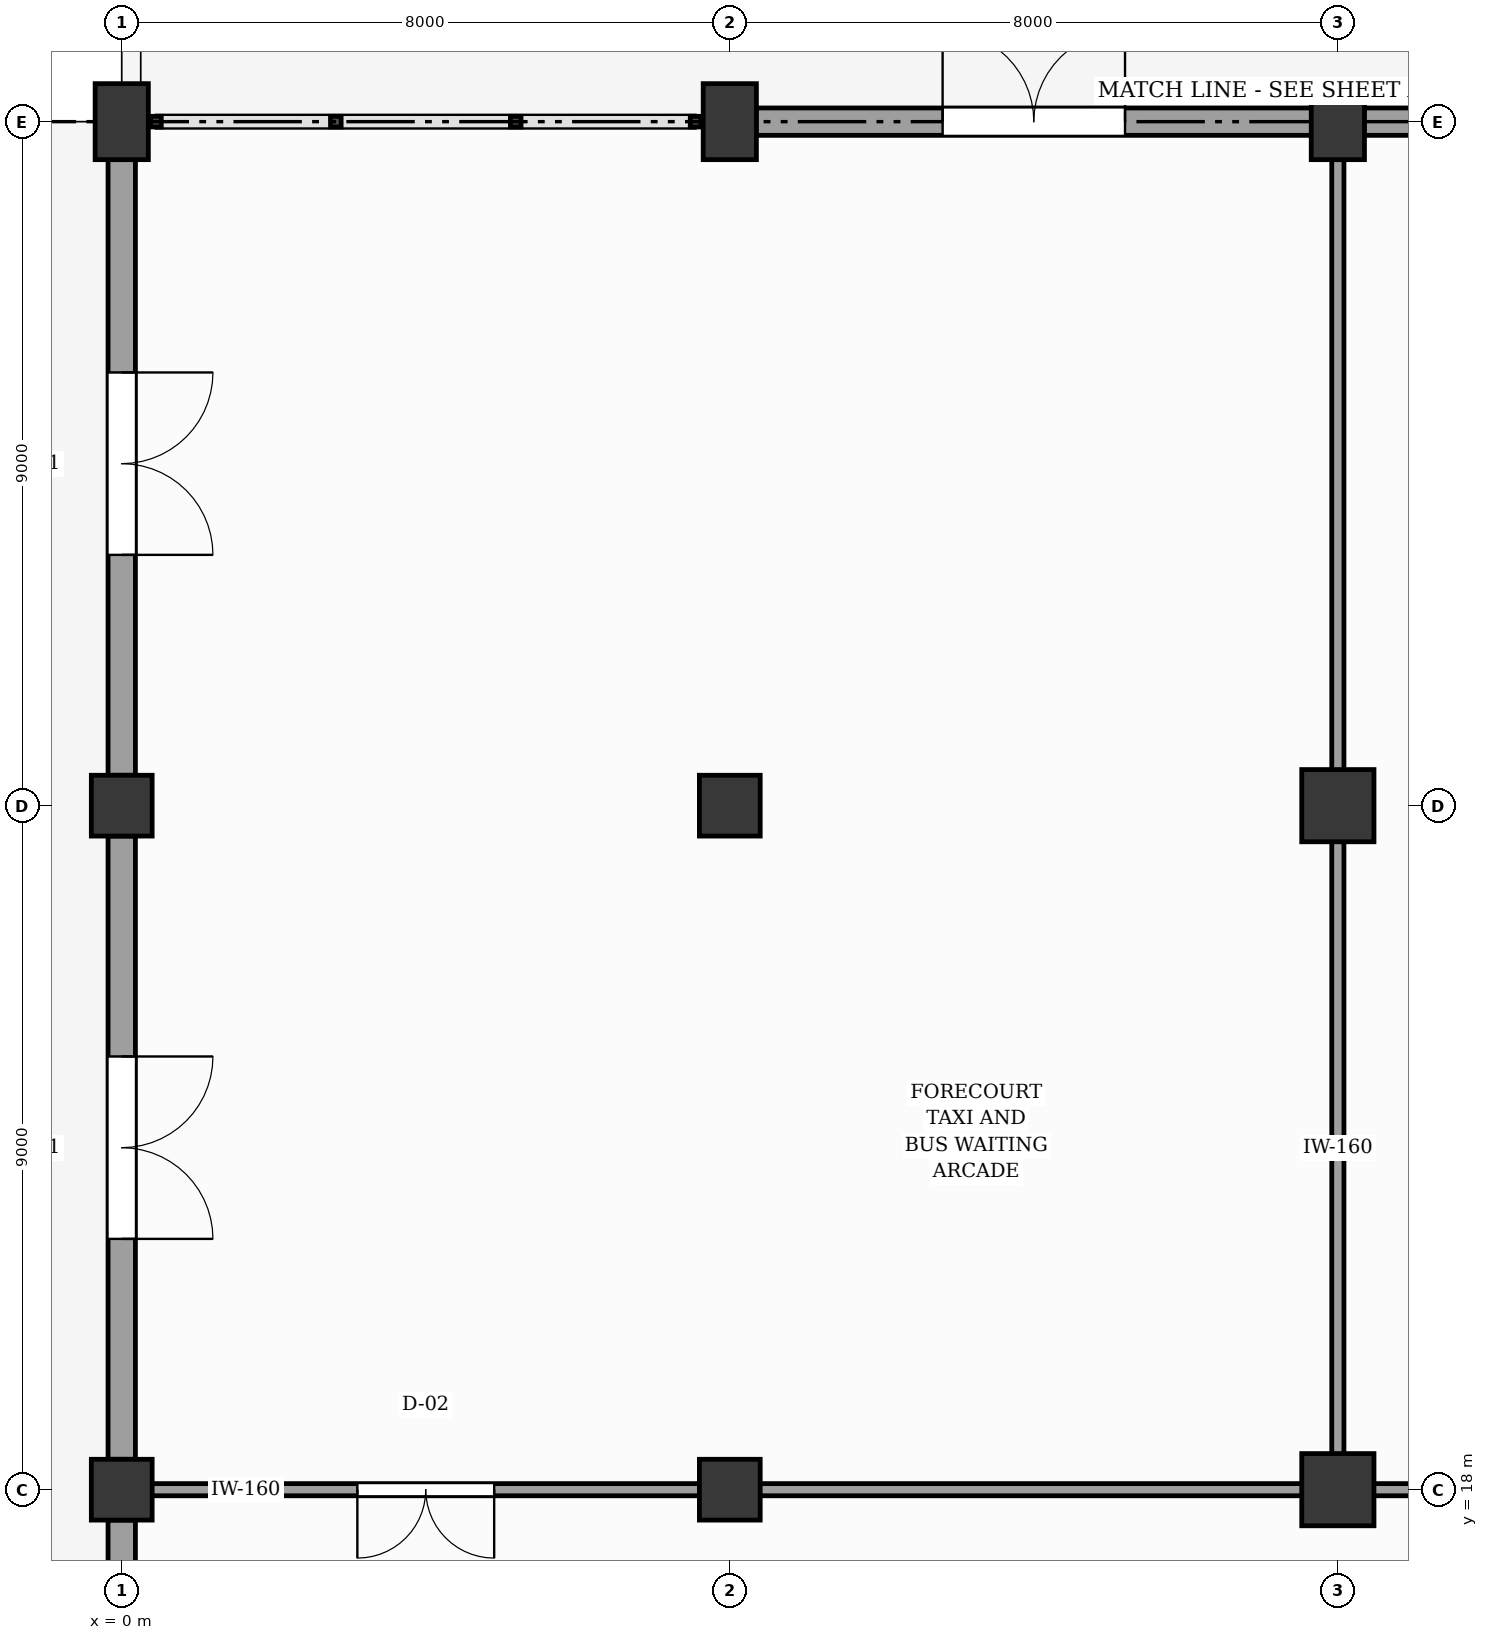
"""IFC4 building model, lengths in metres.
Left out: names, types, materials, properties, quantities, classifications, styles, units other than length and angle.
Written with IfcOpenShell. Run it as: python <this file> out.ifc"""

import sys

from ifc_helpers import new_model, si_unit, direction, frame, frame_2d, origin, origin_2d, place, context, subcontext, project, spatial, rectangle, extrude, element, fill, save


model = new_model("IFC4")
c1 = context("Model", 3, precision=1e-05, world=origin(), true_north=direction((0.0, 1.0)))
c2 = subcontext(c1, "Body", "Model", "MODEL_VIEW")
j1 = project(units=[si_unit("LENGTHUNIT", "METRE"), si_unit("PLANEANGLEUNIT", "RADIAN")], contexts=[c1])
p1 = place(None, origin())
s1 = spatial("IfcSite", under=j1, at=p1, CompositionType="ELEMENT")
p2 = place(p1, origin())
s2 = spatial("IfcBuilding", under=s1, at=p2, CompositionType="ELEMENT")
p3 = place(p2, origin())
s3 = spatial("IfcBuildingStorey", under=s2, at=p3, CompositionType="ELEMENT", Elevation=0.0)
for number, where, z_axis, x_axis in (
    (1, (0.0, 18.0, -0.3), (0.0, 0.0, 1.0), (1.0, 0.0, 0.0)),
    (2, (0.0, 27.0, -0.3), (0.0, 0.0, 1.0), (1.0, 0.0, 0.0)),
):
    element("IfcColumn", number, at=place(p3, frame(where, z_axis=z_axis, x_axis=x_axis)), inside=s3, PredefinedType="COLUMN", context=c2, shape_type="SweptSolid", body=[
        extrude(rectangle(XDim=0.8, YDim=0.8, at=origin_2d()), origin(), (0.0, 0.0, 1.0), 5.1),
    ])
p4 = place(p3, frame((0.0, 36.0, -0.3), z_axis=(0.0, 0.0, 1.0), x_axis=(1.0, 0.0, 0.0)))
e3 = element("IfcColumn", 3, at=p4, inside=s3, PredefinedType="COLUMN", context=c2, shape_type="SweptSolid", body=[
    extrude(rectangle(XDim=0.7, YDim=1.0, at=origin_2d()), origin(), (0.0, 0.0, 1.0), 5.1),
])
for number, where, z_axis, x_axis in (
    (4, (8.0, 18.0, -0.3), (0.0, 0.0, 1.0), (1.0, 0.0, 0.0)),
    (5, (8.0, 27.0, -0.3), (0.0, 0.0, 1.0), (1.0, 0.0, 0.0)),
):
    element("IfcColumn", number, at=place(p3, frame(where, z_axis=z_axis, x_axis=x_axis)), inside=s3, PredefinedType="COLUMN", context=c2, shape_type="SweptSolid", body=[
        extrude(rectangle(XDim=0.8, YDim=0.8, at=origin_2d()), origin(), (0.0, 0.0, 1.0), 5.1),
    ])
p5 = place(p3, frame((8.0, 36.0, -0.3), z_axis=(0.0, 0.0, 1.0), x_axis=(1.0, 0.0, 0.0)))
e6 = element("IfcColumn", 6, at=p5, inside=s3, PredefinedType="COLUMN", context=c2, shape_type="SweptSolid", body=[
    extrude(rectangle(XDim=0.7, YDim=1.0, at=origin_2d()), origin(), (0.0, 0.0, 1.0), 5.1),
])
for number, where, z_axis, x_axis in (
    (7, (16.0, 18.0, -0.3), (0.0, 0.0, 1.0), (1.0, 0.0, 0.0)),
    (8, (16.0, 27.0, -0.3), (0.0, 0.0, 1.0), (1.0, 0.0, 0.0)),
):
    element("IfcColumn", number, at=place(p3, frame(where, z_axis=z_axis, x_axis=x_axis)), inside=s3, PredefinedType="COLUMN", context=c2, shape_type="SweptSolid", body=[
        extrude(rectangle(XDim=0.95, YDim=0.95, at=origin_2d()), origin(), (0.0, 0.0, 1.0), 5.1),
    ])
p6 = place(p3, frame((16.0, 36.0, -0.3), z_axis=(0.0, 0.0, 1.0), x_axis=(1.0, 0.0, 0.0)))
e9 = element("IfcColumn", 9, at=p6, inside=s3, PredefinedType="COLUMN", context=c2, shape_type="SweptSolid", body=[
    extrude(rectangle(XDim=0.7, YDim=1.0, at=origin_2d()), origin(), (0.0, 0.0, 1.0), 5.1),
])
p7 = place(p3, frame((8.345, 36.0, 0.0), z_axis=(0.0, 0.0, 1.0), x_axis=(1.0, 0.0, 0.0)))
e10 = element("IfcWall", 10, at=p7, inside=s3, PredefinedType="SOLIDWALL", context=c2, shape_type="SweptSolid", body=[
    extrude(rectangle(XDim=7.31, YDim=0.36, at=frame_2d((3.655, 0.0))), origin(), (0.0, 0.0, 1.0), 3.31),
])
p8 = place(p7, frame((2.455, 0.0, 0.0)))
e11 = element("IfcOpeningElement", 11, at=p8, cuts=e10, PredefinedType="OPENING", context=c2, shape_type="SweptSolid", body=[
    extrude(rectangle(XDim=2.4, YDim=2.35, at=frame_2d((1.2, 1.175))), frame((0.0, 0.19, 0.0), z_axis=(0.0, -1.0, 0.0), x_axis=(1.0, 0.0, 0.0)), (0.0, 0.0, 1.0), 0.38),
])
p9 = place(p3, frame((16.345, 36.0, 0.0), z_axis=(0.0, 0.0, 1.0), x_axis=(1.0, 0.0, 0.0)))
e12 = element("IfcWall", 12, at=p9, inside=s3, PredefinedType="SOLIDWALL", context=c2, shape_type="SweptSolid", body=[
    extrude(rectangle(XDim=7.31, YDim=0.36, at=frame_2d((3.655, 0.0))), origin(), (0.0, 0.0, 1.0), 3.31),
])
p10 = place(p9, frame((2.755, 0.0, 0.95)))
e13 = element("IfcOpeningElement", 13, at=p10, cuts=e12, PredefinedType="OPENING", context=c2, shape_type="SweptSolid", body=[
    extrude(rectangle(XDim=1.8, YDim=2.22, at=frame_2d((0.9, 1.11))), frame((0.0, 0.19, 0.0), z_axis=(0.0, -1.0, 0.0), x_axis=(1.0, 0.0, 0.0)), (0.0, 0.0, 1.0), 0.38),
])
p11 = place(p3, frame((0.0, 9.4, 0.0), z_axis=(0.0, 0.0, 1.0), x_axis=(0.0, 1.0, 0.0)))
e14 = element("IfcWall", 14, at=p11, inside=s3, PredefinedType="SOLIDWALL", context=c2, shape_type="SweptSolid", body=[
    extrude(rectangle(XDim=8.2, YDim=0.36, at=frame_2d((4.1, 0.0))), origin(), (0.0, 0.0, 1.0), 3.41),
])
p12 = place(p11, frame((2.9, 0.0, 0.0)))
e15 = element("IfcOpeningElement", 15, at=p12, cuts=e14, PredefinedType="OPENING", context=c2, shape_type="SweptSolid", body=[
    extrude(rectangle(XDim=2.4, YDim=2.35, at=frame_2d((1.2, 1.175))), frame((0.0, 0.19, 0.0), z_axis=(0.0, -1.0, 0.0), x_axis=(1.0, 0.0, 0.0)), (0.0, 0.0, 1.0), 0.38),
])
p13 = place(p3, frame((0.0, 18.4, 0.0), z_axis=(0.0, 0.0, 1.0), x_axis=(0.0, 1.0, 0.0)))
e16 = element("IfcWall", 16, at=p13, inside=s3, PredefinedType="SOLIDWALL", context=c2, shape_type="SweptSolid", body=[
    extrude(rectangle(XDim=8.2, YDim=0.36, at=frame_2d((4.1, 0.0))), origin(), (0.0, 0.0, 1.0), 3.41),
])
p14 = place(p13, frame((2.9, 0.0, 0.0)))
e17 = element("IfcOpeningElement", 17, at=p14, cuts=e16, PredefinedType="OPENING", context=c2, shape_type="SweptSolid", body=[
    extrude(rectangle(XDim=2.4, YDim=2.35, at=frame_2d((1.2, 1.175))), frame((0.0, 0.19, 0.0), z_axis=(0.0, -1.0, 0.0), x_axis=(1.0, 0.0, 0.0)), (0.0, 0.0, 1.0), 0.38),
])
p15 = place(p3, frame((0.0, 27.4, 0.0), z_axis=(0.0, 0.0, 1.0), x_axis=(0.0, 1.0, 0.0)))
e18 = element("IfcWall", 18, at=p15, inside=s3, PredefinedType="SOLIDWALL", context=c2, shape_type="SweptSolid", body=[
    extrude(rectangle(XDim=8.2, YDim=0.36, at=frame_2d((4.1, 0.0))), origin(), (0.0, 0.0, 1.0), 3.31),
])
p16 = place(p15, frame((2.9, 0.0, 0.0)))
e19 = element("IfcOpeningElement", 19, at=p16, cuts=e18, PredefinedType="OPENING", context=c2, shape_type="SweptSolid", body=[
    extrude(rectangle(XDim=2.4, YDim=2.35, at=frame_2d((1.2, 1.175))), frame((0.0, 0.19, 0.0), z_axis=(0.0, -1.0, 0.0), x_axis=(1.0, 0.0, 0.0)), (0.0, 0.0, 1.0), 0.38),
])
p17 = place(p3, frame((0.3, 18.0, 0.0), z_axis=(0.0, 0.0, 1.0), x_axis=(1.0, 0.0, 0.0)))
e20 = element("IfcWall", 20, at=p17, inside=s3, PredefinedType="PARTITIONING", context=c2, shape_type="SweptSolid", body=[
    extrude(rectangle(XDim=7.4, YDim=0.16, at=frame_2d((3.7, 0.0))), origin(), (0.0, 0.0, 1.0), 3.41),
])
p18 = place(p17, frame((2.8, 0.0, 0.0)))
e21 = element("IfcOpeningElement", 21, at=p18, cuts=e20, PredefinedType="OPENING", context=c2, shape_type="SweptSolid", body=[
    extrude(rectangle(XDim=1.8, YDim=2.25, at=frame_2d((0.9, 1.125))), frame((0.0, 0.09, 0.0), z_axis=(0.0, -1.0, 0.0), x_axis=(1.0, 0.0, 0.0)), (0.0, 0.0, 1.0), 0.18),
])
p19 = place(p3, frame((8.3, 18.0, 0.0), z_axis=(0.0, 0.0, 1.0), x_axis=(1.0, 0.0, 0.0)))
e22 = element("IfcWall", 22, at=p19, inside=s3, PredefinedType="PARTITIONING", context=c2, shape_type="SweptSolid", body=[
    extrude(rectangle(XDim=7.4, YDim=0.16, at=frame_2d((3.7, 0.0))), origin(), (0.0, 0.0, 1.0), 3.41),
])
p20 = place(p3, frame((16.0, 18.3, 0.0), z_axis=(0.0, 0.0, 1.0), x_axis=(0.0, 1.0, 0.0)))
e23 = element("IfcWall", 23, at=p20, inside=s3, PredefinedType="PARTITIONING", context=c2, shape_type="SweptSolid", body=[
    extrude(rectangle(XDim=8.4, YDim=0.16, at=frame_2d((4.2, 0.0))), origin(), (0.0, 0.0, 1.0), 3.41),
])
p21 = place(p3, frame((16.0, 27.3, 0.0), z_axis=(0.0, 0.0, 1.0), x_axis=(0.0, 1.0, 0.0)))
e24 = element("IfcWall", 24, at=p21, inside=s3, PredefinedType="PARTITIONING", context=c2, shape_type="SweptSolid", body=[
    extrude(rectangle(XDim=8.4, YDim=0.16, at=frame_2d((4.2, 0.0))), origin(), (0.0, 0.0, 1.0), 3.31),
])
p22 = place(p3, frame((16.3, 18.0, 0.0), z_axis=(0.0, 0.0, 1.0), x_axis=(1.0, 0.0, 0.0)))
e25 = element("IfcWall", 25, at=p22, inside=s3, PredefinedType="PARTITIONING", context=c2, shape_type="SweptSolid", body=[
    extrude(rectangle(XDim=7.4, YDim=0.16, at=frame_2d((3.7, 0.0))), origin(), (0.0, 0.0, 1.0), 3.41),
])
p23 = place(p22, frame((3.2, 0.0, 0.0)))
e26 = element("IfcOpeningElement", 26, at=p23, cuts=e25, PredefinedType="OPENING", context=c2, shape_type="SweptSolid", body=[
    extrude(rectangle(XDim=1.0, YDim=2.1, at=frame_2d((0.5, 1.05))), frame((0.0, 0.09, 0.0), z_axis=(0.0, -1.0, 0.0), x_axis=(1.0, 0.0, 0.0)), (0.0, 0.0, 1.0), 0.18),
])
p24 = place(p8, origin())
e27 = element("IfcDoor", 27, at=p24, inside=s3, OperationType="DOUBLE_DOOR_SINGLE_SWING", PredefinedType="DOOR", context=c2, shape_type="SweptSolid", body=[
    extrude(rectangle(XDim=2.4, YDim=2.35, at=frame_2d((1.2, 1.175))), frame((0.0, 0.025, 0.0), z_axis=(0.0, -1.0, 0.0), x_axis=(1.0, 0.0, 0.0)), (0.0, 0.0, 1.0), 0.05),
])
fill(e11, e27)
p25 = place(p14, frame((2.4, 0.0, 0.0), z_axis=(0.0, 0.0, 1.0), x_axis=(-1.0, 0.0, 0.0)))
e28 = element("IfcDoor", 28, at=p25, inside=s3, OperationType="DOUBLE_DOOR_SINGLE_SWING", PredefinedType="DOOR", context=c2, shape_type="SweptSolid", body=[
    extrude(rectangle(XDim=2.4, YDim=2.35, at=frame_2d((1.2, 1.175))), frame((0.0, 0.025, 0.0), z_axis=(0.0, -1.0, 0.0), x_axis=(1.0, 0.0, 0.0)), (0.0, 0.0, 1.0), 0.05),
])
fill(e17, e28)
p26 = place(p16, frame((2.4, 0.0, 0.0), z_axis=(0.0, 0.0, 1.0), x_axis=(-1.0, 0.0, 0.0)))
e29 = element("IfcDoor", 29, at=p26, inside=s3, OperationType="DOUBLE_DOOR_SINGLE_SWING", PredefinedType="DOOR", context=c2, shape_type="SweptSolid", body=[
    extrude(rectangle(XDim=2.4, YDim=2.35, at=frame_2d((1.2, 1.175))), frame((0.0, 0.025, 0.0), z_axis=(0.0, -1.0, 0.0), x_axis=(1.0, 0.0, 0.0)), (0.0, 0.0, 1.0), 0.05),
])
fill(e19, e29)
p27 = place(p18, frame((1.8, 0.0, 0.0), z_axis=(0.0, 0.0, 1.0), x_axis=(-1.0, 0.0, 0.0)))
e30 = element("IfcDoor", 30, at=p27, inside=s3, OperationType="DOUBLE_DOOR_SINGLE_SWING", PredefinedType="DOOR", context=c2, shape_type="SweptSolid", body=[
    extrude(rectangle(XDim=1.8, YDim=2.25, at=frame_2d((0.9, 1.125))), frame((0.0, 0.025, 0.0), z_axis=(0.0, -1.0, 0.0), x_axis=(1.0, 0.0, 0.0)), (0.0, 0.0, 1.0), 0.05),
])
fill(e21, e30)
save(model, sys.argv[1])
